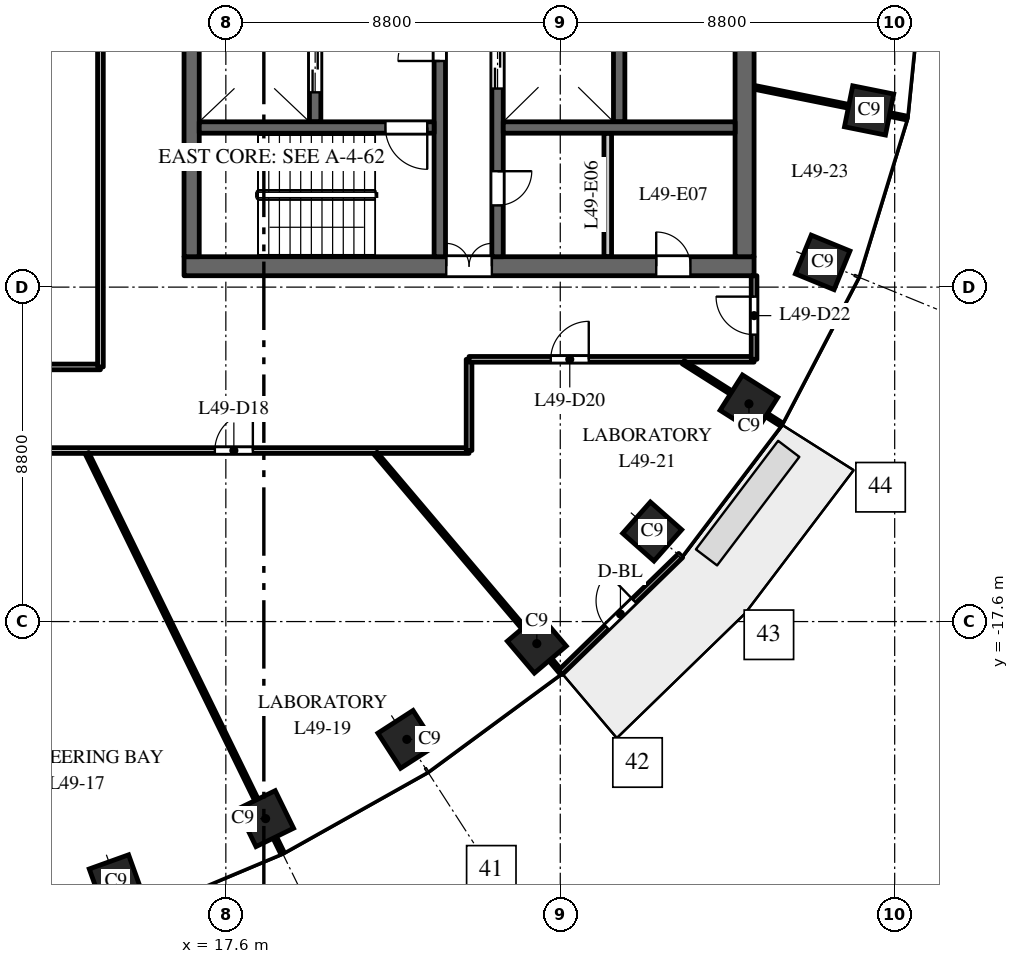
"""IFC4 building model, lengths in metres.
Left out: names, types, materials, properties, quantities, classifications, styles, units other than length and angle.
Written with IfcOpenShell. Run it as: python <this file> out.ifc"""

import sys

from ifc_helpers import new_model, si_unit, direction, frame, frame_2d, origin, origin_2d, place, context, subcontext, project, spatial, rectangle, extrude, element, fill, save


model = new_model("IFC4")
c1 = context("Model", 3, precision=1e-05, world=origin(), true_north=direction((0.0, 1.0)))
c2 = subcontext(c1, "Body", "Model", "MODEL_VIEW")
j1 = project(units=[si_unit("LENGTHUNIT", "METRE"), si_unit("PLANEANGLEUNIT", "RADIAN")], contexts=[c1])
p1 = place(None, origin())
s1 = spatial("IfcSite", under=j1, at=p1, CompositionType="ELEMENT")
p2 = place(p1, origin())
s2 = spatial("IfcBuilding", under=s1, at=p2, CompositionType="ELEMENT")
p3 = place(p2, frame((0.0, 0.0, 237.5)))
s3 = spatial("IfcBuildingStorey", under=s2, at=p3, CompositionType="ELEMENT", Elevation=237.5)
for number, where, z_axis, x_axis in (
    (1, (14.709, -24.441, 0.0), (0.0, 0.0, 1.0), (0.941, 0.338, 0.0)),
    (2, (18.646, -22.785, 0.0), (0.0, 0.0, 1.0), (0.898, 0.439, 0.0)),
    (3, (22.362, -20.7, 0.0), (0.0, 0.0, 1.0), (0.84, 0.542, 0.0)),
    (4, (25.783, -18.18, 0.0), (0.0, 0.0, 1.0), (0.763, 0.646, 0.0)),
    (5, (28.819, -15.23, 0.0), (0.0, 0.0, 1.0), (0.663, 0.749, 0.0)),
    (6, (31.365, -11.871, 0.0), (0.0, 0.0, 1.0), (0.535, 0.845, 0.0)),
    (7, (33.305, -8.149, 0.0), (0.0, 0.0, 1.0), (0.379, 0.925, 0.0)),
    (8, (34.527, -4.151, 0.0), (0.0, 0.0, 1.0), (0.197, 0.98, 0.0)),
):
    element("IfcColumn", number, at=place(p3, frame(where, z_axis=z_axis, x_axis=x_axis)), inside=s3, PredefinedType="COLUMN", context=c2, shape_type="SweptSolid", body=[
        extrude(rectangle(XDim=1.1, YDim=1.1, at=origin_2d()), origin(), (0.0, 0.0, 1.0), 4.0),
    ])
p4 = place(p3, frame((16.5, -8.25, 0.0), z_axis=(0.0, 0.0, 1.0), x_axis=(1.0, 0.0, 0.0)))
e9 = element("IfcWall", 9, at=p4, inside=s3, PredefinedType="SHEAR", context=c2, shape_type="SweptSolid", body=[
    extrude(rectangle(XDim=15.0, YDim=0.5, at=frame_2d((7.5, 0.0))), origin(), (0.0, 0.0, 1.0), 3.7),
])
p5 = place(p4, frame((6.9, 0.0, 0.0)))
e10 = element("IfcOpeningElement", 10, at=p5, cuts=e9, PredefinedType="OPENING", context=c2, shape_type="SweptSolid", body=[
    extrude(rectangle(XDim=1.2, YDim=2.1, at=frame_2d((0.6, 1.05))), frame((0.0, 0.26, 0.0), z_axis=(0.0, -1.0, 0.0), x_axis=(1.0, 0.0, 0.0)), (0.0, 0.0, 1.0), 0.52),
])
p6 = place(p4, frame((12.425, 0.0, 0.0)))
e11 = element("IfcOpeningElement", 11, at=p6, cuts=e9, PredefinedType="OPENING", context=c2, shape_type="SweptSolid", body=[
    extrude(rectangle(XDim=0.9, YDim=2.1, at=frame_2d((0.45, 1.05))), frame((0.0, 0.26, 0.0), z_axis=(0.0, -1.0, 0.0), x_axis=(1.0, 0.0, 0.0)), (0.0, 0.0, 1.0), 0.52),
])
p7 = place(p3, frame((27.95, -4.45, 0.0), z_axis=(0.0, 0.0, 1.0), x_axis=(0.0, 1.0, 0.0)))
e12 = element("IfcWall", 12, at=p7, inside=s3, PredefinedType="SHEAR", context=c2, shape_type="SweptSolid", body=[
    extrude(rectangle(XDim=8.9, YDim=0.3, at=frame_2d((4.45, 0.0))), origin(), (0.0, 0.0, 1.0), 3.7),
])
p8 = place(p3, frame((19.95, -4.45, 0.0), z_axis=(0.0, 0.0, 1.0), x_axis=(0.0, 1.0, 0.0)))
e13 = element("IfcWall", 13, at=p8, inside=s3, PredefinedType="SHEAR", context=c2, shape_type="SweptSolid", body=[
    extrude(rectangle(XDim=8.9, YDim=0.3, at=frame_2d((4.45, 0.0))), origin(), (0.0, 0.0, 1.0), 3.7),
])
p9 = place(p8, frame((0.775, 0.0, 0.0)))
e14 = element("IfcOpeningElement", 14, at=p9, cuts=e13, PredefinedType="OPENING", context=c2, shape_type="SweptSolid", body=[
    extrude(rectangle(XDim=1.2, YDim=2.1, at=frame_2d((0.6, 1.05))), frame((0.0, 0.16, 0.0), z_axis=(0.0, -1.0, 0.0), x_axis=(1.0, 0.0, 0.0)), (0.0, 0.0, 1.0), 0.32),
])
p10 = place(p8, frame((4.675, 0.0, 0.0)))
e15 = element("IfcOpeningElement", 15, at=p10, cuts=e13, PredefinedType="OPENING", context=c2, shape_type="SweptSolid", body=[
    extrude(rectangle(XDim=1.1, YDim=2.1, at=frame_2d((0.55, 1.05))), frame((0.0, 0.16, 0.0), z_axis=(0.0, -1.0, 0.0), x_axis=(1.0, 0.0, 0.0)), (0.0, 0.0, 1.0), 0.32),
])
p11 = place(p8, frame((7.25, 0.0, 0.0)))
e16 = element("IfcOpeningElement", 16, at=p11, cuts=e13, PredefinedType="OPENING", context=c2, shape_type="SweptSolid", body=[
    extrude(rectangle(XDim=1.1, YDim=2.1, at=frame_2d((0.55, 1.05))), frame((0.0, 0.16, 0.0), z_axis=(0.0, -1.0, 0.0), x_axis=(1.0, 0.0, 0.0)), (0.0, 0.0, 1.0), 0.32),
])
p12 = place(p3, frame((24.75, -8.0, 0.0), z_axis=(0.0, 0.0, 1.0), x_axis=(0.0, 1.0, 0.0)))
e17 = element("IfcWall", 17, at=p12, inside=s3, PredefinedType="SHEAR", context=c2, shape_type="SweptSolid", body=[
    extrude(rectangle(XDim=16.0, YDim=0.3, at=frame_2d((8.0, 0.0))), origin(), (0.0, 0.0, 1.0), 3.7),
])
p13 = place(p12, frame((4.425, 0.0, 0.0)))
e18 = element("IfcOpeningElement", 18, at=p13, cuts=e17, PredefinedType="OPENING", context=c2, shape_type="SweptSolid", body=[
    extrude(rectangle(XDim=1.1, YDim=2.1, at=frame_2d((0.55, 1.05))), frame((0.0, 0.16, 0.0), z_axis=(0.0, -1.0, 0.0), x_axis=(1.0, 0.0, 0.0)), (0.0, 0.0, 1.0), 0.32),
])
p14 = place(p12, frame((7.45, 0.0, 0.0)))
e19 = element("IfcOpeningElement", 19, at=p14, cuts=e17, PredefinedType="OPENING", context=c2, shape_type="SweptSolid", body=[
    extrude(rectangle(XDim=1.1, YDim=2.1, at=frame_2d((0.55, 1.05))), frame((0.0, 0.16, 0.0), z_axis=(0.0, -1.0, 0.0), x_axis=(1.0, 0.0, 0.0)), (0.0, 0.0, 1.0), 0.32),
])
p15 = place(p12, frame((10.475, 0.0, 0.0)))
e20 = element("IfcOpeningElement", 20, at=p15, cuts=e17, PredefinedType="OPENING", context=c2, shape_type="SweptSolid", body=[
    extrude(rectangle(XDim=1.1, YDim=2.1, at=frame_2d((0.55, 1.05))), frame((0.0, 0.16, 0.0), z_axis=(0.0, -1.0, 0.0), x_axis=(1.0, 0.0, 0.0)), (0.0, 0.0, 1.0), 0.32),
])
p16 = place(p12, frame((13.75, 0.0, 0.0)))
e21 = element("IfcOpeningElement", 21, at=p16, cuts=e17, PredefinedType="OPENING", context=c2, shape_type="SweptSolid", body=[
    extrude(rectangle(XDim=0.9, YDim=2.1, at=frame_2d((0.45, 1.05))), frame((0.0, 0.16, 0.0), z_axis=(0.0, -1.0, 0.0), x_axis=(1.0, 0.0, 0.0)), (0.0, 0.0, 1.0), 0.32),
])
p17 = place(p12, frame((1.35, 0.0, 0.0)))
e22 = element("IfcOpeningElement", 22, at=p17, cuts=e17, PredefinedType="OPENING", context=c2, shape_type="SweptSolid", body=[
    extrude(rectangle(XDim=0.9, YDim=2.1, at=frame_2d((0.45, 1.05))), frame((0.0, 0.16, 0.0), z_axis=(0.0, -1.0, 0.0), x_axis=(1.0, 0.0, 0.0)), (0.0, 0.0, 1.0), 0.32),
])
p18 = place(p3, frame((16.7, -8.0, 0.0), z_axis=(0.0, 0.0, 1.0), x_axis=(0.0, 1.0, 0.0)))
e23 = element("IfcWall", 23, at=p18, inside=s3, PredefinedType="SHEAR", context=c2, shape_type="SweptSolid", body=[
    extrude(rectangle(XDim=16.0, YDim=0.4, at=frame_2d((8.0, 0.0))), origin(), (0.0, 0.0, 1.0), 3.7),
])
p19 = place(p3, frame((31.25, -8.0, 0.0), z_axis=(0.0, 0.0, 1.0), x_axis=(0.0, 1.0, 0.0)))
e24 = element("IfcWall", 24, at=p19, inside=s3, PredefinedType="SHEAR", context=c2, shape_type="SweptSolid", body=[
    extrude(rectangle(XDim=16.0, YDim=0.5, at=frame_2d((8.0, 0.0))), origin(), (0.0, 0.0, 1.0), 3.7),
])
p20 = place(p3, frame((27.65, -8.0, 0.0), z_axis=(0.0, 0.0, 1.0), x_axis=(0.0, 1.0, 0.0)))
e25 = element("IfcWall", 25, at=p20, inside=s3, PredefinedType="PARTITIONING", context=c2, shape_type="SweptSolid", body=[
    extrude(rectangle(XDim=3.25, YDim=0.2, at=frame_2d((1.625, 0.0))), origin(), (0.0, 0.0, 1.0), 3.7),
])
p21 = place(p3, frame((24.9, -4.6, 0.0), z_axis=(0.0, 0.0, 1.0), x_axis=(1.0, 0.0, 0.0)))
e26 = element("IfcWall", 26, at=p21, inside=s3, PredefinedType="SHEAR", context=c2, shape_type="SweptSolid", body=[
    extrude(rectangle(XDim=6.1, YDim=0.3, at=frame_2d((3.05, 0.0))), origin(), (0.0, 0.0, 1.0), 3.7),
])
p22 = place(p3, frame((23.23, -8.0, 0.0), z_axis=(0.0, 0.0, 1.0), x_axis=(0.0, 1.0, 0.0)))
e27 = element("IfcWall", 27, at=p22, inside=s3, PredefinedType="SHEAR", context=c2, shape_type="SweptSolid", body=[
    extrude(rectangle(XDim=7.875, YDim=0.3, at=frame_2d((3.938, 0.0))), origin(), (0.0, 0.0, 1.0), 3.7),
])
p23 = place(p22, frame((5.15, 0.0, 0.0)))
e28 = element("IfcOpeningElement", 28, at=p23, cuts=e27, PredefinedType="OPENING", context=c2, shape_type="SweptSolid", body=[
    extrude(rectangle(XDim=1.1, YDim=2.1, at=frame_2d((0.55, 1.05))), frame((0.0, 0.16, 0.0), z_axis=(0.0, -1.0, 0.0), x_axis=(1.0, 0.0, 0.0)), (0.0, 0.0, 1.0), 0.32),
])
p24 = place(p3, frame((16.9, -4.6, 0.0), z_axis=(0.0, 0.0, 1.0), x_axis=(1.0, 0.0, 0.0)))
e29 = element("IfcWall", 29, at=p24, inside=s3, PredefinedType="SHEAR", context=c2, shape_type="SweptSolid", body=[
    extrude(rectangle(XDim=6.18, YDim=0.3, at=frame_2d((3.09, 0.0))), origin(), (0.0, 0.0, 1.0), 3.7),
])
p25 = place(p24, frame((4.9, 0.0, 0.0)))
e30 = element("IfcOpeningElement", 30, at=p25, cuts=e29, PredefinedType="OPENING", context=c2, shape_type="SweptSolid", body=[
    extrude(rectangle(XDim=1.1, YDim=2.1, at=frame_2d((0.55, 1.05))), frame((0.0, 0.16, 0.0), z_axis=(0.0, -1.0, 0.0), x_axis=(1.0, 0.0, 0.0)), (0.0, 0.0, 1.0), 0.32),
])
p26 = place(p3, frame((26.396, -18.943, 0.0), z_axis=(0.0, 0.0, 1.0), x_axis=(0.717214761864, 0.696852197647, 0.0)))
e31 = element("IfcWall", 31, at=p26, inside=s3, PredefinedType="STANDARD", context=c2, shape_type="SweptSolid", body=[
    extrude(rectangle(XDim=4.424, YDim=0.15, at=frame_2d((2.212, 0.0))), origin(), (0.0, 0.0, 1.0), 3.7),
])
p27 = place(p26, frame((1.712, 0.0, 0.0)))
e32 = element("IfcOpeningElement", 32, at=p27, cuts=e31, PredefinedType="OPENING", context=c2, shape_type="SweptSolid", body=[
    extrude(rectangle(XDim=1.0, YDim=2.4, at=frame_2d((0.5, 1.2))), frame((0.0, 0.085, 0.0), z_axis=(0.0, -1.0, 0.0), x_axis=(1.0, 0.0, 0.0)), (0.0, 0.0, 1.0), 0.17),
])
p28 = place(p3, frame((-14.3, -10.9, 0.0), z_axis=(0.0, 0.0, 1.0), x_axis=(1.0, 0.0, 0.0)))
e33 = element("IfcWall", 33, at=p28, inside=s3, PredefinedType="PARTITIONING", context=c2, shape_type="SweptSolid", body=[
    extrude(rectangle(XDim=28.6, YDim=0.15, at=frame_2d((14.3, 0.0))), origin(), (0.0, 0.0, 1.0), 2.85),
])
p29 = place(p28, frame((11.4, 0.0, 0.0)))
e34 = element("IfcOpeningElement", 34, at=p29, cuts=e33, PredefinedType="OPENING", context=c2, shape_type="SweptSolid", body=[
    extrude(rectangle(XDim=1.0, YDim=2.1, at=frame_2d((0.5, 1.05))), frame((0.0, 0.085, 0.0), z_axis=(0.0, -1.0, 0.0), x_axis=(1.0, 0.0, 0.0)), (0.0, 0.0, 1.0), 0.17),
])
p30 = place(p28, frame((16.167, 0.0, 0.0)))
e35 = element("IfcOpeningElement", 35, at=p30, cuts=e33, PredefinedType="OPENING", context=c2, shape_type="SweptSolid", body=[
    extrude(rectangle(XDim=1.0, YDim=2.1, at=frame_2d((0.5, 1.05))), frame((0.0, 0.085, 0.0), z_axis=(0.0, -1.0, 0.0), x_axis=(1.0, 0.0, 0.0)), (0.0, 0.0, 1.0), 0.17),
])
p31 = place(p3, frame((7.524, -13.1, 0.0), z_axis=(0.0, 0.0, 1.0), x_axis=(1.0, 0.0, 0.0)))
e36 = element("IfcWall", 36, at=p31, inside=s3, PredefinedType="PARTITIONING", context=c2, shape_type="SweptSolid", body=[
    extrude(rectangle(XDim=16.476, YDim=0.15, at=frame_2d((8.238, 0.0))), origin(), (0.0, 0.0, 1.0), 2.85),
])
p32 = place(p31, frame((2.633, 0.0, 0.0)))
e37 = element("IfcOpeningElement", 37, at=p32, cuts=e36, PredefinedType="OPENING", context=c2, shape_type="SweptSolid", body=[
    extrude(rectangle(XDim=1.0, YDim=2.1, at=frame_2d((0.5, 1.05))), frame((0.0, 0.085, 0.0), z_axis=(0.0, -1.0, 0.0), x_axis=(1.0, 0.0, 0.0)), (0.0, 0.0, 1.0), 0.17),
])
p33 = place(p31, frame((9.787, 0.0, 0.0)))
e38 = element("IfcOpeningElement", 38, at=p33, cuts=e36, PredefinedType="OPENING", context=c2, shape_type="SweptSolid", body=[
    extrude(rectangle(XDim=1.0, YDim=2.1, at=frame_2d((0.5, 1.05))), frame((0.0, 0.085, 0.0), z_axis=(0.0, -1.0, 0.0), x_axis=(1.0, 0.0, 0.0)), (0.0, 0.0, 1.0), 0.17),
])
p34 = place(p3, frame((13.948, -13.175, 0.0), z_axis=(0.0, 0.0, 1.0), x_axis=(0.439190294188, -0.898394059136, 0.0)))
e39 = element("IfcWall", 39, at=p34, inside=s3, PredefinedType="PARTITIONING", context=c2, shape_type="SweptSolid", body=[
    extrude(rectangle(XDim=11.699, YDim=0.1, at=frame_2d((5.849, 0.0))), origin(), (0.0, 0.0, 1.0), 3.0),
])
p35 = place(p3, frame((14.3, -10.9, 0.0), z_axis=(0.0, 0.0, 1.0), x_axis=(0.0, 1.0, 0.0)))
e40 = element("IfcWall", 40, at=p35, inside=s3, PredefinedType="PARTITIONING", context=c2, shape_type="SweptSolid", body=[
    extrude(rectangle(XDim=21.8, YDim=0.15, at=frame_2d((10.9, 0.0))), origin(), (0.0, 0.0, 1.0), 2.75),
])
p36 = place(p35, frame((10.4, 0.0, 0.0)))
e41 = element("IfcOpeningElement", 41, at=p36, cuts=e40, PredefinedType="OPENING", context=c2, shape_type="SweptSolid", body=[
    extrude(rectangle(XDim=1.0, YDim=2.1, at=frame_2d((0.5, 1.05))), frame((0.0, 0.085, 0.0), z_axis=(0.0, -1.0, 0.0), x_axis=(1.0, 0.0, 0.0)), (0.0, 0.0, 1.0), 0.17),
])
p37 = place(p3, frame((21.542, -13.175, 0.0), z_axis=(0.0, 0.0, 1.0), x_axis=(0.646374865928, -0.763020008058, 0.0)))
e42 = element("IfcWall", 42, at=p37, inside=s3, PredefinedType="PARTITIONING", context=c2, shape_type="SweptSolid", body=[
    extrude(rectangle(XDim=7.562, YDim=0.1, at=frame_2d((3.781, 0.0))), origin(), (0.0, 0.0, 1.0), 3.0),
])
p38 = place(p3, frame((24.0, -13.1, 0.0), z_axis=(0.0, 0.0, 1.0), x_axis=(0.0, 1.0, 0.0)))
e43 = element("IfcWall", 43, at=p38, inside=s3, PredefinedType="PARTITIONING", context=c2, shape_type="SweptSolid", body=[
    extrude(rectangle(XDim=2.4, YDim=0.15, at=frame_2d((1.2, 0.0))), origin(), (0.0, 0.0, 1.0), 2.75),
])
p39 = place(p3, frame((24.0, -10.7, 0.0), z_axis=(0.0, 0.0, 1.0), x_axis=(1.0, 0.0, 0.0)))
e44 = element("IfcWall", 44, at=p39, inside=s3, PredefinedType="PARTITIONING", context=c2, shape_type="SweptSolid", body=[
    extrude(rectangle(XDim=7.5, YDim=0.15, at=frame_2d((3.75, 0.0))), origin(), (0.0, 0.0, 1.0), 3.0),
])
p40 = place(p39, frame((2.15, 0.0, 0.0)))
e45 = element("IfcOpeningElement", 45, at=p40, cuts=e44, PredefinedType="OPENING", context=c2, shape_type="SweptSolid", body=[
    extrude(rectangle(XDim=1.0, YDim=2.1, at=frame_2d((0.5, 1.05))), frame((0.0, 0.085, 0.0), z_axis=(0.0, -1.0, 0.0), x_axis=(1.0, 0.0, 0.0)), (0.0, 0.0, 1.0), 0.17),
])
p41 = place(p3, frame((29.637, -10.777, 0.0), z_axis=(0.0, 0.0, 1.0), x_axis=(0.844810627195, -0.535065420467, 0.0)))
e46 = element("IfcWall", 46, at=p41, inside=s3, PredefinedType="PARTITIONING", context=c2, shape_type="SweptSolid", body=[
    extrude(rectangle(XDim=3.048, YDim=0.1, at=frame_2d((1.524, 0.0))), origin(), (0.0, 0.0, 1.0), 3.0),
])
p42 = place(p3, frame((31.5, -10.7, 0.0), z_axis=(0.0, 0.0, 1.0), x_axis=(0.0, 1.0, 0.0)))
e47 = element("IfcWall", 47, at=p42, inside=s3, PredefinedType="PARTITIONING", context=c2, shape_type="SweptSolid", body=[
    extrude(rectangle(XDim=2.2, YDim=0.15, at=frame_2d((1.1, 0.0))), origin(), (0.0, 0.0, 1.0), 3.0),
])
p43 = place(p42, frame((0.65, 0.0, 0.0)))
e48 = element("IfcOpeningElement", 48, at=p43, cuts=e47, PredefinedType="OPENING", context=c2, shape_type="SweptSolid", body=[
    extrude(rectangle(XDim=1.0, YDim=2.1, at=frame_2d((0.5, 1.05))), frame((0.0, 0.085, 0.0), z_axis=(0.0, -1.0, 0.0), x_axis=(1.0, 0.0, 0.0)), (0.0, 0.0, 1.0), 0.17),
])
p44 = place(p3, frame((31.5, -3.542, 0.0), z_axis=(0.0, 0.0, 1.0), x_axis=(0.980357474535, -0.197228857227, 0.0)))
e49 = element("IfcWall", 49, at=p44, inside=s3, PredefinedType="PARTITIONING", context=c2, shape_type="SweptSolid", body=[
    extrude(rectangle(XDim=4.092, YDim=0.1, at=frame_2d((2.046, 0.0))), origin(), (0.0, 0.0, 1.0), 3.0),
])
p45 = place(p9, origin())
e50 = element("IfcDoor", 50, at=p45, inside=s3, OperationType="DOUBLE_DOOR_SLIDING", PredefinedType="DOOR", context=c2, shape_type="SweptSolid", body=[
    extrude(rectangle(XDim=1.2, YDim=2.1, at=frame_2d((0.6, 1.05))), frame((0.0, 0.025, 0.0), z_axis=(0.0, -1.0, 0.0), x_axis=(1.0, 0.0, 0.0)), (0.0, 0.0, 1.0), 0.05),
])
fill(e14, e50)
p46 = place(p13, origin())
e51 = element("IfcDoor", 51, at=p46, inside=s3, OperationType="DOUBLE_DOOR_SLIDING", PredefinedType="DOOR", context=c2, shape_type="SweptSolid", body=[
    extrude(rectangle(XDim=1.1, YDim=2.1, at=frame_2d((0.55, 1.05))), frame((0.0, 0.025, 0.0), z_axis=(0.0, -1.0, 0.0), x_axis=(1.0, 0.0, 0.0)), (0.0, 0.0, 1.0), 0.05),
])
fill(e18, e51)
p47 = place(p25, origin())
e52 = element("IfcDoor", 52, at=p47, inside=s3, OperationType="SINGLE_SWING_RIGHT", PredefinedType="DOOR", context=c2, shape_type="SweptSolid", body=[
    extrude(rectangle(XDim=1.1, YDim=2.1, at=frame_2d((0.55, 1.05))), frame((0.0, 0.025, 0.0), z_axis=(0.0, -1.0, 0.0), x_axis=(1.0, 0.0, 0.0)), (0.0, 0.0, 1.0), 0.05),
])
fill(e30, e52)
p48 = place(p23, origin())
e53 = element("IfcDoor", 53, at=p48, inside=s3, OperationType="SINGLE_SWING_RIGHT", PredefinedType="DOOR", context=c2, shape_type="SweptSolid", body=[
    extrude(rectangle(XDim=1.1, YDim=2.1, at=frame_2d((0.55, 1.05))), frame((0.0, 0.025, 0.0), z_axis=(0.0, -1.0, 0.0), x_axis=(1.0, 0.0, 0.0)), (0.0, 0.0, 1.0), 0.05),
])
fill(e28, e53)
p49 = place(p5, origin())
e54 = element("IfcDoor", 54, at=p49, inside=s3, OperationType="DOUBLE_DOOR_DOUBLE_SWING", PredefinedType="DOOR", context=c2, shape_type="SweptSolid", body=[
    extrude(rectangle(XDim=1.2, YDim=2.1, at=frame_2d((0.6, 1.05))), frame((0.0, 0.025, 0.0), z_axis=(0.0, -1.0, 0.0), x_axis=(1.0, 0.0, 0.0)), (0.0, 0.0, 1.0), 0.05),
])
fill(e10, e54)
p50 = place(p17, origin())
e55 = element("IfcDoor", 55, at=p50, inside=s3, OperationType="SINGLE_SWING_RIGHT", PredefinedType="DOOR", context=c2, shape_type="SweptSolid", body=[
    extrude(rectangle(XDim=0.9, YDim=2.1, at=frame_2d((0.45, 1.05))), frame((0.0, 0.025, 0.0), z_axis=(0.0, -1.0, 0.0), x_axis=(1.0, 0.0, 0.0)), (0.0, 0.0, 1.0), 0.05),
])
fill(e22, e55)
p51 = place(p6, origin())
e56 = element("IfcDoor", 56, at=p51, inside=s3, OperationType="SINGLE_SWING_RIGHT", PredefinedType="DOOR", context=c2, shape_type="SweptSolid", body=[
    extrude(rectangle(XDim=0.9, YDim=2.1, at=frame_2d((0.45, 1.05))), frame((0.0, 0.025, 0.0), z_axis=(0.0, -1.0, 0.0), x_axis=(1.0, 0.0, 0.0)), (0.0, 0.0, 1.0), 0.05),
])
fill(e11, e56)
p52 = place(p27, origin())
e57 = element("IfcDoor", 57, at=p52, inside=s3, OperationType="SINGLE_SWING_RIGHT", PredefinedType="DOOR", context=c2, shape_type="SweptSolid", body=[
    extrude(rectangle(XDim=1.0, YDim=2.4, at=frame_2d((0.5, 1.2))), frame((0.0, 0.025, 0.0), z_axis=(0.0, -1.0, 0.0), x_axis=(1.0, 0.0, 0.0)), (0.0, 0.0, 1.0), 0.05),
])
fill(e32, e57)
p53 = place(p33, origin())
e58 = element("IfcDoor", 58, at=p53, inside=s3, OperationType="SINGLE_SWING_RIGHT", PredefinedType="DOOR", context=c2, shape_type="SweptSolid", body=[
    extrude(rectangle(XDim=1.0, YDim=2.1, at=frame_2d((0.5, 1.05))), frame((0.0, 0.025, 0.0), z_axis=(0.0, -1.0, 0.0), x_axis=(1.0, 0.0, 0.0)), (0.0, 0.0, 1.0), 0.05),
])
fill(e38, e58)
p54 = place(p40, origin())
e59 = element("IfcDoor", 59, at=p54, inside=s3, OperationType="SINGLE_SWING_RIGHT", PredefinedType="DOOR", context=c2, shape_type="SweptSolid", body=[
    extrude(rectangle(XDim=1.0, YDim=2.1, at=frame_2d((0.5, 1.05))), frame((0.0, 0.025, 0.0), z_axis=(0.0, -1.0, 0.0), x_axis=(1.0, 0.0, 0.0)), (0.0, 0.0, 1.0), 0.05),
])
fill(e45, e59)
p55 = place(p43, origin())
e60 = element("IfcDoor", 60, at=p55, inside=s3, OperationType="SINGLE_SWING_RIGHT", PredefinedType="DOOR", context=c2, shape_type="SweptSolid", body=[
    extrude(rectangle(XDim=1.0, YDim=2.1, at=frame_2d((0.5, 1.05))), frame((0.0, 0.025, 0.0), z_axis=(0.0, -1.0, 0.0), x_axis=(1.0, 0.0, 0.0)), (0.0, 0.0, 1.0), 0.05),
])
fill(e48, e60)
save(model, sys.argv[1])
